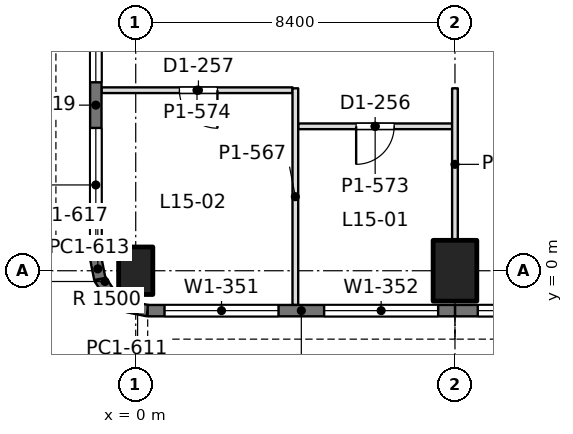
"""IFC4 building model, lengths in metres.
Left out: names, types, materials, properties, quantities, classifications, styles, units other than length and angle.
Written with IfcOpenShell. Run it as: python <this file> out.ifc"""

import sys

from ifc_helpers import new_model, si_unit, direction, frame, frame_2d, origin, origin_with_axes, origin_2d, place, context, subcontext, project, spatial, rectangle, extrude, element, fill, save


model = new_model("IFC4")
c1 = context("Model", 3, precision=1e-05, world=origin(), true_north=direction((0.0, 1.0)))
c2 = subcontext(c1, "Body", "Model", "MODEL_VIEW")
j1 = project(units=[si_unit("LENGTHUNIT", "METRE"), si_unit("PLANEANGLEUNIT", "RADIAN")], contexts=[c1])
p1 = place(None, origin())
s1 = spatial("IfcSite", under=j1, at=p1, CompositionType="ELEMENT")
p2 = place(p1, origin())
s2 = spatial("IfcBuilding", under=s1, at=p2, CompositionType="ELEMENT")
p3 = place(p2, frame((0.0, 0.0, 68.4)))
s3 = spatial("IfcBuildingStorey", under=s2, at=p3, CompositionType="ELEMENT", Elevation=68.4)
p4 = place(p3, origin_with_axes())
e1 = element("IfcColumn", 1, at=p4, inside=s3, PredefinedType="COLUMN", context=c2, shape_type="SweptSolid", body=[
    extrude(rectangle(XDim=0.9, YDim=1.25, at=origin_2d()), origin(), (0.0, 0.0, 1.0), 4.5),
])
p5 = place(p3, frame((8.4, 0.0, 0.0), z_axis=(0.0, 0.0, 1.0), x_axis=(1.0, 0.0, 0.0)))
e2 = element("IfcColumn", 2, at=p5, inside=s3, PredefinedType="COLUMN", context=c2, shape_type="SweptSolid", body=[
    extrude(rectangle(XDim=1.15, YDim=1.6, at=origin_2d()), origin(), (0.0, 0.0, 1.0), 4.5),
])
p6 = place(p3, frame((16.8, -1.05, 0.0), z_axis=(0.0, 0.0, 1.0), x_axis=(-1.0, 0.0, 0.0)))
e3 = element("IfcWall", 3, at=p6, inside=s3, PredefinedType="SOLIDWALL", context=c2, shape_type="SweptSolid", body=[
    extrude(rectangle(XDim=8.4, YDim=0.3, at=frame_2d((4.2, 0.0))), origin(), (0.0, 0.0, 1.0), 4.34),
])
p7 = place(p6, frame((0.6, 0.0, 0.9)))
e4 = element("IfcOpeningElement", 4, at=p7, cuts=e3, PredefinedType="OPENING", context=c2, shape_type="SweptSolid", body=[
    extrude(rectangle(XDim=3.0, YDim=1.9, at=frame_2d((1.5, 0.95))), frame((0.0, 0.16, 0.0), z_axis=(0.0, -1.0, 0.0), x_axis=(1.0, 0.0, 0.0)), (0.0, 0.0, 1.0), 0.32),
])
p8 = place(p6, frame((4.8, 0.0, 0.9)))
e5 = element("IfcOpeningElement", 5, at=p8, cuts=e3, PredefinedType="OPENING", context=c2, shape_type="SweptSolid", body=[
    extrude(rectangle(XDim=3.0, YDim=1.9, at=frame_2d((1.5, 0.95))), frame((0.0, 0.16, 0.0), z_axis=(0.0, -1.0, 0.0), x_axis=(1.0, 0.0, 0.0)), (0.0, 0.0, 1.0), 0.32),
])
p9 = place(p3, frame((8.4, -1.05, 0.0), z_axis=(0.0, 0.0, 1.0), x_axis=(-1.0, 0.0, 0.0)))
e6 = element("IfcWall", 6, at=p9, inside=s3, PredefinedType="SOLIDWALL", context=c2, shape_type="SweptSolid", body=[
    extrude(rectangle(XDim=8.085, YDim=0.3, at=frame_2d((4.042, 0.0))), origin(), (0.0, 0.0, 1.0), 4.34),
])
p10 = place(p9, frame((0.443, 0.0, 0.9)))
e7 = element("IfcOpeningElement", 7, at=p10, cuts=e6, PredefinedType="OPENING", context=c2, shape_type="SweptSolid", body=[
    extrude(rectangle(XDim=3.0, YDim=1.9, at=frame_2d((1.5, 0.95))), frame((0.0, 0.16, 0.0), z_axis=(0.0, -1.0, 0.0), x_axis=(1.0, 0.0, 0.0)), (0.0, 0.0, 1.0), 0.32),
])
p11 = place(p9, frame((4.643, 0.0, 0.9)))
e8 = element("IfcOpeningElement", 8, at=p11, cuts=e6, PredefinedType="OPENING", context=c2, shape_type="SweptSolid", body=[
    extrude(rectangle(XDim=3.0, YDim=1.9, at=frame_2d((1.5, 0.95))), frame((0.0, 0.16, 0.0), z_axis=(0.0, -1.0, 0.0), x_axis=(1.0, 0.0, 0.0)), (0.0, 0.0, 1.0), 0.32),
])
p12 = place(p3, frame((0.315, -1.05, 0.0), z_axis=(0.0, 0.0, 1.0), x_axis=(-0.980788534345, 0.195073962632, 0.0)))
e9 = element("IfcWall", 9, at=p12, inside=s3, PredefinedType="SOLIDWALL", context=c2, shape_type="SweptSolid", body=[
    extrude(rectangle(XDim=0.541, YDim=0.3, at=frame_2d((0.271, 0.0))), origin(), (0.0, 0.0, 1.0), 4.34),
])
for number, where, z_axis, x_axis in (
    (10, (-0.216, -0.945, 0.0), (0.0, 0.0, 1.0), (-0.831, 0.556, 0.0)),
    (11, (-0.653, -0.653, 0.0), (0.0, 0.0, 1.0), (-0.556, 0.831, 0.0)),
):
    element("IfcWall", number, at=place(p3, frame(where, z_axis=z_axis, x_axis=x_axis)), inside=s3, PredefinedType="SOLIDWALL", context=c2, shape_type="SweptSolid", body=[
        extrude(rectangle(XDim=0.526, YDim=0.3, at=frame_2d((0.263, 0.0))), origin(), (0.0, 0.0, 1.0), 4.34),
    ])
p13 = place(p3, frame((-0.945, -0.216, 0.0), z_axis=(0.0, 0.0, 1.0), x_axis=(-0.195073962632, 0.980788534345, 0.0)))
e12 = element("IfcWall", 12, at=p13, inside=s3, PredefinedType="SOLIDWALL", context=c2, shape_type="SweptSolid", body=[
    extrude(rectangle(XDim=0.541, YDim=0.3, at=frame_2d((0.271, 0.0))), origin(), (0.0, 0.0, 1.0), 4.34),
])
p14 = place(p3, frame((-1.05, 0.315, 0.0), z_axis=(0.0, 0.0, 1.0), x_axis=(0.0, 1.0, 0.0)))
e13 = element("IfcWall", 13, at=p14, inside=s3, PredefinedType="SOLIDWALL", context=c2, shape_type="SweptSolid", body=[
    extrude(rectangle(XDim=8.085, YDim=0.3, at=frame_2d((4.042, 0.0))), origin(), (0.0, 0.0, 1.0), 4.34),
])
p15 = place(p14, frame((0.443, 0.0, 0.9)))
e14 = element("IfcOpeningElement", 14, at=p15, cuts=e13, PredefinedType="OPENING", context=c2, shape_type="SweptSolid", body=[
    extrude(rectangle(XDim=3.0, YDim=1.9, at=frame_2d((1.5, 0.95))), frame((0.0, 0.16, 0.0), z_axis=(0.0, -1.0, 0.0), x_axis=(1.0, 0.0, 0.0)), (0.0, 0.0, 1.0), 0.32),
])
p16 = place(p14, frame((4.643, 0.0, 0.9)))
e15 = element("IfcOpeningElement", 15, at=p16, cuts=e13, PredefinedType="OPENING", context=c2, shape_type="SweptSolid", body=[
    extrude(rectangle(XDim=3.0, YDim=1.9, at=frame_2d((1.5, 0.95))), frame((0.0, 0.16, 0.0), z_axis=(0.0, -1.0, 0.0), x_axis=(1.0, 0.0, 0.0)), (0.0, 0.0, 1.0), 0.32),
])
p17 = place(p3, frame((-0.902, 4.75, 0.0), z_axis=(0.0, 0.0, 1.0), x_axis=(1.0, 0.0, 0.0)))
e16 = element("IfcWall", 16, at=p17, inside=s3, PredefinedType="PARTITIONING", context=c2, shape_type="SweptSolid", body=[
    extrude(rectangle(XDim=5.028, YDim=0.15, at=frame_2d((2.514, 0.0))), origin(), (0.0, 0.0, 1.0), 3.84),
])
p18 = place(p17, frame((2.052, 0.0, 0.0)))
e17 = element("IfcOpeningElement", 17, at=p18, cuts=e16, PredefinedType="OPENING", context=c2, shape_type="SweptSolid", body=[
    extrude(rectangle(XDim=1.0, YDim=2.2, at=frame_2d((0.5, 1.1))), frame((0.0, 0.085, 0.0), z_axis=(0.0, -1.0, 0.0), x_axis=(1.0, 0.0, 0.0)), (0.0, 0.0, 1.0), 0.17),
])
p19 = place(p3, frame((4.274, 3.8, 0.0), z_axis=(0.0, 0.0, 1.0), x_axis=(1.0, 0.0, 0.0)))
e18 = element("IfcWall", 18, at=p19, inside=s3, PredefinedType="PARTITIONING", context=c2, shape_type="SweptSolid", body=[
    extrude(rectangle(XDim=4.052, YDim=0.15, at=frame_2d((2.026, 0.0))), origin(), (0.0, 0.0, 1.0), 3.74),
])
p20 = place(p19, frame((1.526, 0.0, 0.0)))
e19 = element("IfcOpeningElement", 19, at=p20, cuts=e18, PredefinedType="OPENING", context=c2, shape_type="SweptSolid", body=[
    extrude(rectangle(XDim=1.0, YDim=2.2, at=frame_2d((0.5, 1.1))), frame((0.0, 0.085, 0.0), z_axis=(0.0, -1.0, 0.0), x_axis=(1.0, 0.0, 0.0)), (0.0, 0.0, 1.0), 0.17),
])
p21 = place(p3, frame((4.2, -0.902, 0.0), z_axis=(0.0, 0.0, 1.0), x_axis=(0.0, 1.0, 0.0)))
e20 = element("IfcWall", 20, at=p21, inside=s3, PredefinedType="PARTITIONING", context=c2, shape_type="SweptSolid", body=[
    extrude(rectangle(XDim=5.702, YDim=0.15, at=frame_2d((2.851, 0.0))), origin(), (0.0, 0.0, 1.0), 3.84),
])
p22 = place(p3, frame((8.4, 0.799, 0.0), z_axis=(0.0, 0.0, 1.0), x_axis=(0.0, 1.0, 0.0)))
e21 = element("IfcWall", 21, at=p22, inside=s3, PredefinedType="PARTITIONING", context=c2, shape_type="SweptSolid", body=[
    extrude(rectangle(XDim=4.001, YDim=0.15, at=frame_2d((2.0, 0.0))), origin(), (0.0, 0.0, 1.0), 3.74),
])
p23 = place(p8, origin())
e22 = element("IfcWindow", 22, at=p23, inside=s3, PartitioningType="SINGLE_PANEL", PredefinedType="WINDOW", context=c2, shape_type="SweptSolid", body=[
    extrude(rectangle(XDim=3.0, YDim=1.9, at=frame_2d((1.5, 0.95))), frame((0.0, 0.03, 0.0), z_axis=(0.0, -1.0, 0.0), x_axis=(1.0, 0.0, 0.0)), (0.0, 0.0, 1.0), 0.06),
])
fill(e5, e22)
p24 = place(p10, origin())
e23 = element("IfcWindow", 23, at=p24, inside=s3, PartitioningType="SINGLE_PANEL", PredefinedType="WINDOW", context=c2, shape_type="SweptSolid", body=[
    extrude(rectangle(XDim=3.0, YDim=1.9, at=frame_2d((1.5, 0.95))), frame((0.0, 0.03, 0.0), z_axis=(0.0, -1.0, 0.0), x_axis=(1.0, 0.0, 0.0)), (0.0, 0.0, 1.0), 0.06),
])
fill(e7, e23)
p25 = place(p11, origin())
e24 = element("IfcWindow", 24, at=p25, inside=s3, PartitioningType="SINGLE_PANEL", PredefinedType="WINDOW", context=c2, shape_type="SweptSolid", body=[
    extrude(rectangle(XDim=3.0, YDim=1.9, at=frame_2d((1.5, 0.95))), frame((0.0, 0.03, 0.0), z_axis=(0.0, -1.0, 0.0), x_axis=(1.0, 0.0, 0.0)), (0.0, 0.0, 1.0), 0.06),
])
fill(e8, e24)
p26 = place(p15, origin())
e25 = element("IfcWindow", 25, at=p26, inside=s3, PartitioningType="SINGLE_PANEL", PredefinedType="WINDOW", context=c2, shape_type="SweptSolid", body=[
    extrude(rectangle(XDim=3.0, YDim=1.9, at=frame_2d((1.5, 0.95))), frame((0.0, 0.03, 0.0), z_axis=(0.0, -1.0, 0.0), x_axis=(1.0, 0.0, 0.0)), (0.0, 0.0, 1.0), 0.06),
])
fill(e14, e25)
p27 = place(p16, origin())
e26 = element("IfcWindow", 26, at=p27, inside=s3, PartitioningType="SINGLE_PANEL", PredefinedType="WINDOW", context=c2, shape_type="SweptSolid", body=[
    extrude(rectangle(XDim=3.0, YDim=1.9, at=frame_2d((1.5, 0.95))), frame((0.0, 0.03, 0.0), z_axis=(0.0, -1.0, 0.0), x_axis=(1.0, 0.0, 0.0)), (0.0, 0.0, 1.0), 0.06),
])
fill(e15, e26)
p28 = place(p18, frame((1.0, 0.0, 0.0), z_axis=(0.0, 0.0, 1.0), x_axis=(-1.0, 0.0, 0.0)))
e27 = element("IfcDoor", 27, at=p28, inside=s3, OperationType="SINGLE_SWING_LEFT", PredefinedType="DOOR", context=c2, shape_type="SweptSolid", body=[
    extrude(rectangle(XDim=1.0, YDim=2.2, at=frame_2d((0.5, 1.1))), frame((0.0, 0.025, 0.0), z_axis=(0.0, -1.0, 0.0), x_axis=(1.0, 0.0, 0.0)), (0.0, 0.0, 1.0), 0.05),
])
fill(e17, e27)
p29 = place(p20, frame((1.0, 0.0, 0.0), z_axis=(0.0, 0.0, 1.0), x_axis=(-1.0, 0.0, 0.0)))
e28 = element("IfcDoor", 28, at=p29, inside=s3, OperationType="SINGLE_SWING_RIGHT", PredefinedType="DOOR", context=c2, shape_type="SweptSolid", body=[
    extrude(rectangle(XDim=1.0, YDim=2.2, at=frame_2d((0.5, 1.1))), frame((0.0, 0.025, 0.0), z_axis=(0.0, -1.0, 0.0), x_axis=(1.0, 0.0, 0.0)), (0.0, 0.0, 1.0), 0.05),
])
fill(e19, e28)
save(model, sys.argv[1])
